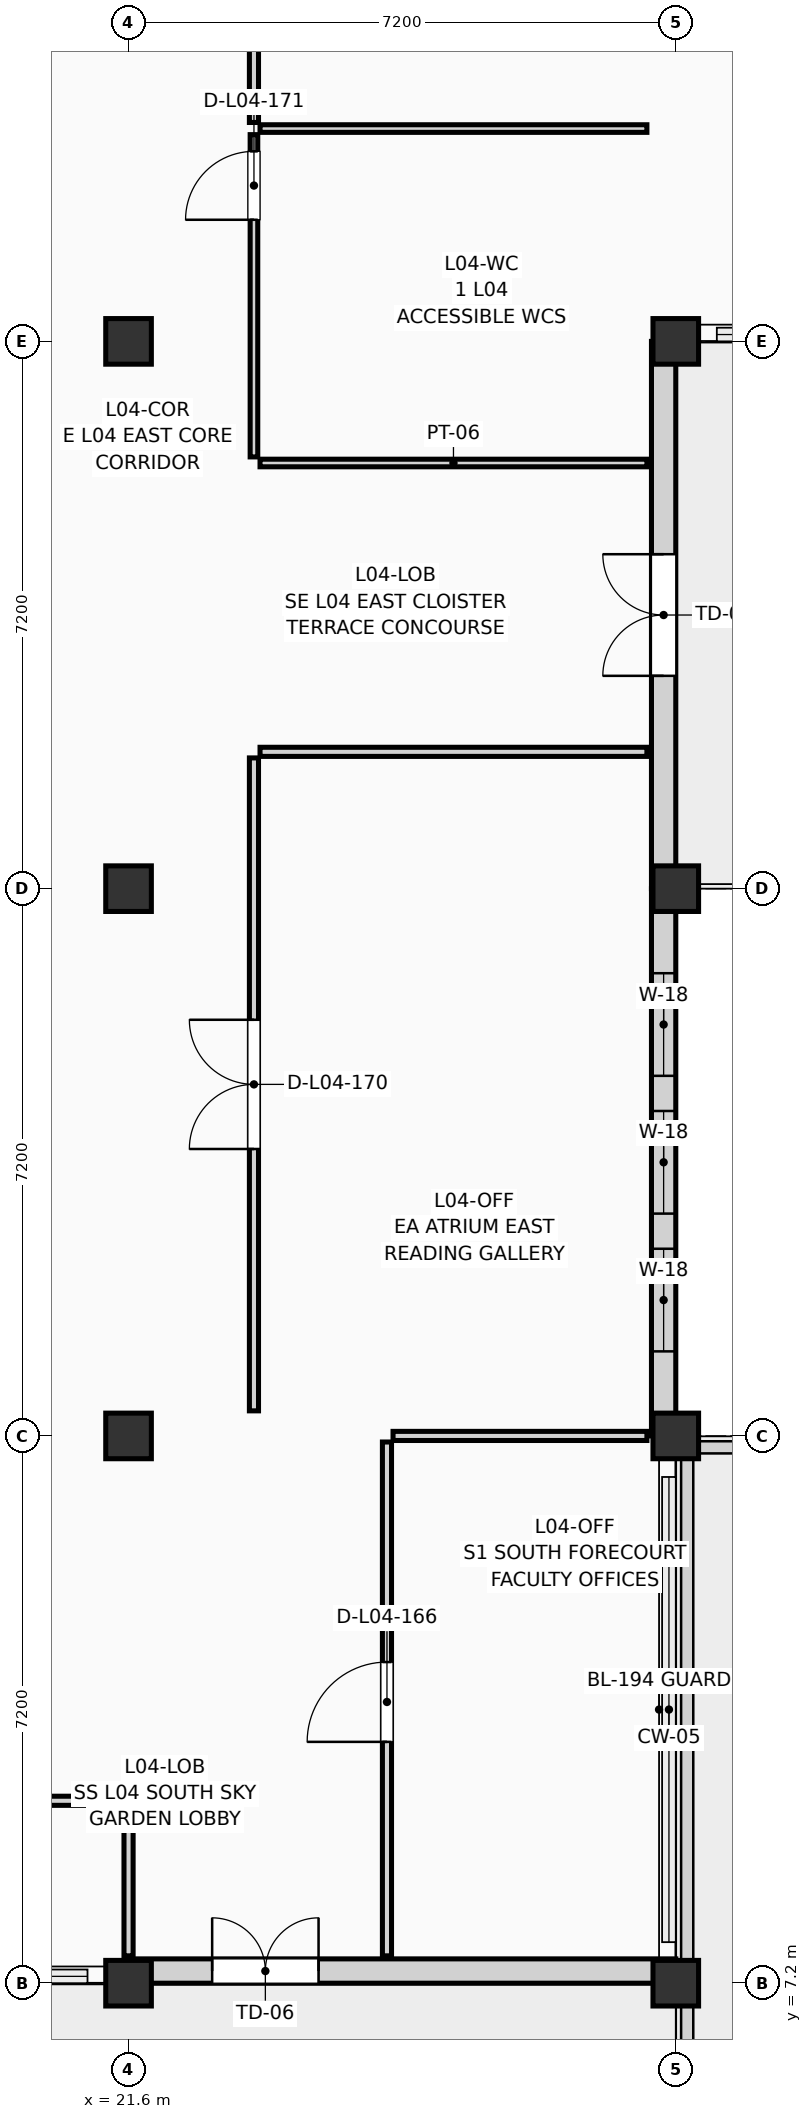
"""IFC4 building model, lengths in metres.
Left out: names, types, materials, properties, quantities, classifications, styles, units other than length and angle.
Written with IfcOpenShell. Run it as: python <this file> out.ifc"""

import sys

from ifc_helpers import new_model, si_unit, direction, frame, frame_2d, origin, origin_2d, place, context, subcontext, project, spatial, rectangle, extrude, element, fill, save


model = new_model("IFC4")
c1 = context("Model", 3, precision=1e-05, world=origin(), true_north=direction((0.0, 1.0)))
c2 = subcontext(c1, "Body", "Model", "MODEL_VIEW")
j1 = project(units=[si_unit("LENGTHUNIT", "METRE"), si_unit("PLANEANGLEUNIT", "RADIAN")], contexts=[c1])
p1 = place(None, origin())
s1 = spatial("IfcSite", under=j1, at=p1, CompositionType="ELEMENT")
p2 = place(p1, origin())
s2 = spatial("IfcBuilding", under=s1, at=p2, CompositionType="ELEMENT")
p3 = place(p2, frame((0.0, 0.0, 15.75)))
s3 = spatial("IfcBuildingStorey", under=s2, at=p3, CompositionType="ELEMENT", Elevation=15.75)
for number, where, z_axis, x_axis in (
    (1, (21.6, 7.2, 0.0), (0.0, 0.0, 1.0), (1.0, 0.0, 0.0)),
    (2, (21.6, 14.4, 0.0), (0.0, 0.0, 1.0), (1.0, 0.0, 0.0)),
    (3, (21.6, 21.6, 0.0), (0.0, 0.0, 1.0), (1.0, 0.0, 0.0)),
    (4, (21.6, 28.8, 0.0), (0.0, 0.0, 1.0), (1.0, 0.0, 0.0)),
    (5, (28.8, 7.2, 0.0), (0.0, 0.0, 1.0), (1.0, 0.0, 0.0)),
    (6, (28.8, 14.4, 0.0), (0.0, 0.0, 1.0), (1.0, 0.0, 0.0)),
    (7, (28.8, 21.6, 0.0), (0.0, 0.0, 1.0), (1.0, 0.0, 0.0)),
    (8, (28.8, 28.8, 0.0), (0.0, 0.0, 1.0), (1.0, 0.0, 0.0)),
):
    element("IfcColumn", number, at=place(p3, frame(where, z_axis=z_axis, x_axis=x_axis)), inside=s3, PredefinedType="COLUMN", context=c2, shape_type="SweptSolid", body=[
        extrude(rectangle(XDim=0.6, YDim=0.6, at=origin_2d()), origin(), (0.0, 0.0, 1.0), 3.6),
    ])
p4 = place(p3, frame((28.64, 21.6, 0.0), z_axis=(0.0, 0.0, 1.0), x_axis=(0.0, 1.0, 0.0)))
e9 = element("IfcWall", 9, at=p4, inside=s3, PredefinedType="SOLIDWALL", context=c2, shape_type="SweptSolid", body=[
    extrude(rectangle(XDim=7.2, YDim=0.32, at=frame_2d((3.6, 0.0))), origin(), (0.0, 0.0, 1.0), 2.84),
])
p5 = place(p4, frame((2.8, 0.0, 0.0)))
e10 = element("IfcOpeningElement", 10, at=p5, cuts=e9, PredefinedType="OPENING", context=c2, shape_type="SweptSolid", body=[
    extrude(rectangle(XDim=1.6, YDim=2.25, at=frame_2d((0.8, 1.125))), frame((0.0, 0.172, 0.0), z_axis=(0.0, -1.0, 0.0), x_axis=(1.0, 0.0, 0.0)), (0.0, 0.0, 1.0), 0.344),
])
p6 = place(p3, frame((28.64, 14.4, 0.0), z_axis=(0.0, 0.0, 1.0), x_axis=(0.0, 1.0, 0.0)))
e11 = element("IfcWall", 11, at=p6, inside=s3, PredefinedType="SOLIDWALL", context=c2, shape_type="SweptSolid", body=[
    extrude(rectangle(XDim=7.2, YDim=0.32, at=frame_2d((3.6, 0.0))), origin(), (0.0, 0.0, 1.0), 2.84),
])
p7 = place(p6, frame((1.113, 0.0, 0.18)))
e12 = element("IfcOpeningElement", 12, at=p7, cuts=e11, PredefinedType="OPENING", context=c2, shape_type="SweptSolid", body=[
    extrude(rectangle(XDim=1.35, YDim=2.45, at=frame_2d((0.675, 1.225))), frame((0.0, 0.172, 0.0), z_axis=(0.0, -1.0, 0.0), x_axis=(1.0, 0.0, 0.0)), (0.0, 0.0, 1.0), 0.344),
])
p8 = place(p6, frame((2.925, 0.0, 0.18)))
e13 = element("IfcOpeningElement", 13, at=p8, cuts=e11, PredefinedType="OPENING", context=c2, shape_type="SweptSolid", body=[
    extrude(rectangle(XDim=1.35, YDim=2.45, at=frame_2d((0.675, 1.225))), frame((0.0, 0.172, 0.0), z_axis=(0.0, -1.0, 0.0), x_axis=(1.0, 0.0, 0.0)), (0.0, 0.0, 1.0), 0.344),
])
p9 = place(p6, frame((4.738, 0.0, 0.18)))
e14 = element("IfcOpeningElement", 14, at=p9, cuts=e11, PredefinedType="OPENING", context=c2, shape_type="SweptSolid", body=[
    extrude(rectangle(XDim=1.35, YDim=2.45, at=frame_2d((0.675, 1.225))), frame((0.0, 0.172, 0.0), z_axis=(0.0, -1.0, 0.0), x_axis=(1.0, 0.0, 0.0)), (0.0, 0.0, 1.0), 0.344),
])
p10 = place(p3, frame((21.6, 7.36, 0.0), z_axis=(0.0, 0.0, 1.0), x_axis=(1.0, 0.0, 0.0)))
e15 = element("IfcWall", 15, at=p10, inside=s3, PredefinedType="SOLIDWALL", context=c2, shape_type="SweptSolid", body=[
    extrude(rectangle(XDim=7.2, YDim=0.32, at=frame_2d((3.6, 0.0))), origin(), (0.0, 0.0, 1.0), 2.84),
])
p11 = place(p10, frame((1.1, 0.0, 0.0)))
e16 = element("IfcOpeningElement", 16, at=p11, cuts=e15, PredefinedType="OPENING", context=c2, shape_type="SweptSolid", body=[
    extrude(rectangle(XDim=1.4, YDim=2.2, at=frame_2d((0.7, 1.1))), frame((0.0, 0.172, 0.0), z_axis=(0.0, -1.0, 0.0), x_axis=(1.0, 0.0, 0.0)), (0.0, 0.0, 1.0), 0.344),
])
for number, where, z_axis, x_axis in (
    (17, (43.05, 14.25, 0.1), (0.0, 0.0, 1.0), (-1.0, 0.0, 0.0)),
    (18, (28.95, 14.25, 0.1), (0.0, 0.0, 1.0), (0.0, -1.0, 0.0)),
):
    element("IfcWall", number, at=place(p3, frame(where, z_axis=z_axis, x_axis=x_axis)), inside=s3, PredefinedType="PARAPET", context=c2, shape_type="SweptSolid", body=[
        extrude(rectangle(XDim=14.1, YDim=0.16, at=frame_2d((7.05, 0.0))), origin(), (0.0, 0.0, 1.0), 1.0),
    ])
p12 = place(p3, frame((21.6, 7.56, 0.0), z_axis=(0.0, 0.0, 1.0), x_axis=(0.0, 1.0, 0.0)))
e19 = element("IfcWall", 19, at=p12, inside=s3, PredefinedType="PARTITIONING", context=c2, shape_type="SweptSolid", body=[
    extrude(rectangle(XDim=1.96, YDim=0.12, at=frame_2d((0.98, 0.0))), origin(), (0.0, 0.0, 1.0), 2.655),
])
p13 = place(p3, frame((7.58, 9.6, 0.0), z_axis=(0.0, 0.0, 1.0), x_axis=(1.0, 0.0, 0.0)))
e20 = element("IfcWall", 20, at=p13, inside=s3, PredefinedType="PARTITIONING", context=c2, shape_type="SweptSolid", body=[
    extrude(rectangle(XDim=13.94, YDim=0.12, at=frame_2d((6.97, 0.0))), origin(), (0.0, 0.0, 1.0), 3.375),
])
p14 = place(p13, frame((7.325, 0.0, 0.0)))
e21 = element("IfcOpeningElement", 21, at=p14, cuts=e20, PredefinedType="OPENING", context=c2, shape_type="SweptSolid", body=[
    extrude(rectangle(XDim=1.32, YDim=2.2, at=frame_2d((0.66, 1.1))), frame((0.0, 0.072, 0.0), z_axis=(0.0, -1.0, 0.0), x_axis=(1.0, 0.0, 0.0)), (0.0, 0.0, 1.0), 0.144),
])
p15 = place(p3, frame((25.0, 7.56, 0.0), z_axis=(0.0, 0.0, 1.0), x_axis=(0.0, 1.0, 0.0)))
e22 = element("IfcWall", 22, at=p15, inside=s3, PredefinedType="PARTITIONING", context=c2, shape_type="SweptSolid", body=[
    extrude(rectangle(XDim=6.76, YDim=0.12, at=frame_2d((3.38, 0.0))), origin(), (0.0, 0.0, 1.0), 3.375),
])
p16 = place(p15, frame((2.815, 0.0, 0.0)))
e23 = element("IfcOpeningElement", 23, at=p16, cuts=e22, PredefinedType="OPENING", context=c2, shape_type="SweptSolid", body=[
    extrude(rectangle(XDim=1.05, YDim=2.18, at=frame_2d((0.525, 1.09))), frame((0.0, 0.072, 0.0), z_axis=(0.0, -1.0, 0.0), x_axis=(1.0, 0.0, 0.0)), (0.0, 0.0, 1.0), 0.144),
])
p17 = place(p3, frame((25.08, 14.4, 0.0), z_axis=(0.0, 0.0, 1.0), x_axis=(1.0, 0.0, 0.0)))
e24 = element("IfcWall", 24, at=p17, inside=s3, PredefinedType="PARTITIONING", context=c2, shape_type="SweptSolid", body=[
    extrude(rectangle(XDim=3.34, YDim=0.12, at=frame_2d((1.67, 0.0))), origin(), (0.0, 0.0, 1.0), 2.655),
])
p18 = place(p3, frame((23.25, 14.73, 0.0), z_axis=(0.0, 0.0, 1.0), x_axis=(0.0, 1.0, 0.0)))
e25 = element("IfcWall", 25, at=p18, inside=s3, PredefinedType="PARTITIONING", context=c2, shape_type="SweptSolid", body=[
    extrude(rectangle(XDim=8.59, YDim=0.12, at=frame_2d((4.295, 0.0))), origin(), (0.0, 0.0, 1.0), 3.375),
])
p19 = place(p18, frame((3.445, 0.0, 0.0)))
e26 = element("IfcOpeningElement", 26, at=p19, cuts=e25, PredefinedType="OPENING", context=c2, shape_type="SweptSolid", body=[
    extrude(rectangle(XDim=1.7, YDim=2.28, at=frame_2d((0.85, 1.14))), frame((0.0, 0.072, 0.0), z_axis=(0.0, -1.0, 0.0), x_axis=(1.0, 0.0, 0.0)), (0.0, 0.0, 1.0), 0.144),
])
p20 = place(p3, frame((23.33, 23.4, 0.0), z_axis=(0.0, 0.0, 1.0), x_axis=(1.0, 0.0, 0.0)))
e27 = element("IfcWall", 27, at=p20, inside=s3, PredefinedType="PARTITIONING", context=c2, shape_type="SweptSolid", body=[
    extrude(rectangle(XDim=5.09, YDim=0.12, at=frame_2d((2.545, 0.0))), origin(), (0.0, 0.0, 1.0), 3.375),
])
p21 = place(p3, frame((23.25, 27.28, 0.0), z_axis=(0.0, 0.0, 1.0), x_axis=(0.0, 1.0, 0.0)))
e28 = element("IfcWall", 28, at=p21, inside=s3, PredefinedType="PARTITIONING", context=c2, shape_type="SweptSolid", body=[
    extrude(rectangle(XDim=4.24, YDim=0.1, at=frame_2d((2.12, 0.0))), origin(), (0.0, 0.0, 1.0), 3.375),
])
p22 = place(p21, frame((3.12, 0.0, 0.0)))
e29 = element("IfcOpeningElement", 29, at=p22, cuts=e28, PredefinedType="OPENING", context=c2, shape_type="SweptSolid", body=[
    extrude(rectangle(XDim=0.9, YDim=2.1, at=frame_2d((0.45, 1.05))), frame((0.0, 0.062, 0.0), z_axis=(0.0, -1.0, 0.0), x_axis=(1.0, 0.0, 0.0)), (0.0, 0.0, 1.0), 0.124),
])
for number, where, z_axis, x_axis in (
    (30, (23.33, 27.2, 0.0), (0.0, 0.0, 1.0), (1.0, 0.0, 0.0)),
    (31, (23.33, 31.6, 0.0), (0.0, 0.0, 1.0), (1.0, 0.0, 0.0)),
):
    element("IfcWall", number, at=place(p3, frame(where, z_axis=z_axis, x_axis=x_axis)), inside=s3, PredefinedType="PARTITIONING", context=c2, shape_type="SweptSolid", body=[
        extrude(rectangle(XDim=5.09, YDim=0.1, at=frame_2d((2.545, 0.0))), origin(), (0.0, 0.0, 1.0), 3.375),
    ])
p23 = place(p3, frame((23.25, 31.68, 0.0), z_axis=(0.0, 0.0, 1.0), x_axis=(0.0, 1.0, 0.0)))
e32 = element("IfcWall", 32, at=p23, inside=s3, PredefinedType="PARTITIONING", context=c2, shape_type="SweptSolid", body=[
    extrude(rectangle(XDim=10.64, YDim=0.12, at=frame_2d((5.32, 0.0))), origin(), (0.0, 0.0, 1.0), 3.375),
])
p24 = place(p23, frame((5.77, 0.0, 0.0)))
e33 = element("IfcOpeningElement", 33, at=p24, cuts=e32, PredefinedType="OPENING", context=c2, shape_type="SweptSolid", body=[
    extrude(rectangle(XDim=1.32, YDim=2.2, at=frame_2d((0.66, 1.1))), frame((0.0, 0.072, 0.0), z_axis=(0.0, -1.0, 0.0), x_axis=(1.0, 0.0, 0.0)), (0.0, 0.0, 1.0), 0.144),
])
p25 = place(p5, origin())
e34 = element("IfcDoor", 34, at=p25, inside=s3, OperationType="DOUBLE_DOOR_SINGLE_SWING", PredefinedType="DOOR", context=c2, shape_type="SweptSolid", body=[
    extrude(rectangle(XDim=1.6, YDim=2.25, at=frame_2d((0.8, 1.125))), frame((0.0, 0.025, 0.0), z_axis=(0.0, -1.0, 0.0), x_axis=(1.0, 0.0, 0.0)), (0.0, 0.0, 1.0), 0.05),
])
fill(e10, e34)
p26 = place(p7, origin())
e35 = element("IfcWindow", 35, at=p26, inside=s3, PartitioningType="SINGLE_PANEL", PredefinedType="WINDOW", context=c2, shape_type="SweptSolid", body=[
    extrude(rectangle(XDim=1.35, YDim=2.45, at=frame_2d((0.675, 1.225))), frame((0.0, 0.03, 0.0), z_axis=(0.0, -1.0, 0.0), x_axis=(1.0, 0.0, 0.0)), (0.0, 0.0, 1.0), 0.06),
])
fill(e12, e35)
p27 = place(p8, origin())
e36 = element("IfcWindow", 36, at=p27, inside=s3, PartitioningType="SINGLE_PANEL", PredefinedType="WINDOW", context=c2, shape_type="SweptSolid", body=[
    extrude(rectangle(XDim=1.35, YDim=2.45, at=frame_2d((0.675, 1.225))), frame((0.0, 0.03, 0.0), z_axis=(0.0, -1.0, 0.0), x_axis=(1.0, 0.0, 0.0)), (0.0, 0.0, 1.0), 0.06),
])
fill(e13, e36)
p28 = place(p9, origin())
e37 = element("IfcWindow", 37, at=p28, inside=s3, PartitioningType="SINGLE_PANEL", PredefinedType="WINDOW", context=c2, shape_type="SweptSolid", body=[
    extrude(rectangle(XDim=1.35, YDim=2.45, at=frame_2d((0.675, 1.225))), frame((0.0, 0.03, 0.0), z_axis=(0.0, -1.0, 0.0), x_axis=(1.0, 0.0, 0.0)), (0.0, 0.0, 1.0), 0.06),
])
fill(e14, e37)
p29 = place(p11, origin())
e38 = element("IfcDoor", 38, at=p29, inside=s3, OperationType="DOUBLE_DOOR_SINGLE_SWING", PredefinedType="DOOR", context=c2, shape_type="SweptSolid", body=[
    extrude(rectangle(XDim=1.4, YDim=2.2, at=frame_2d((0.7, 1.1))), frame((0.0, 0.025, 0.0), z_axis=(0.0, -1.0, 0.0), x_axis=(1.0, 0.0, 0.0)), (0.0, 0.0, 1.0), 0.05),
])
fill(e16, e38)
p30 = place(p16, origin())
e39 = element("IfcDoor", 39, at=p30, inside=s3, OperationType="SINGLE_SWING_LEFT", PredefinedType="DOOR", context=c2, shape_type="SweptSolid", body=[
    extrude(rectangle(XDim=1.05, YDim=2.18, at=frame_2d((0.525, 1.09))), frame((0.0, 0.025, 0.0), z_axis=(0.0, -1.0, 0.0), x_axis=(1.0, 0.0, 0.0)), (0.0, 0.0, 1.0), 0.05),
])
fill(e23, e39)
p31 = place(p19, origin())
e40 = element("IfcDoor", 40, at=p31, inside=s3, OperationType="DOUBLE_DOOR_SINGLE_SWING", PredefinedType="DOOR", context=c2, shape_type="SweptSolid", body=[
    extrude(rectangle(XDim=1.7, YDim=2.28, at=frame_2d((0.85, 1.14))), frame((0.0, 0.025, 0.0), z_axis=(0.0, -1.0, 0.0), x_axis=(1.0, 0.0, 0.0)), (0.0, 0.0, 1.0), 0.05),
])
fill(e26, e40)
p32 = place(p22, origin())
e41 = element("IfcDoor", 41, at=p32, inside=s3, OperationType="SINGLE_SWING_LEFT", PredefinedType="DOOR", context=c2, shape_type="SweptSolid", body=[
    extrude(rectangle(XDim=0.9, YDim=2.1, at=frame_2d((0.45, 1.05))), frame((0.0, 0.025, 0.0), z_axis=(0.0, -1.0, 0.0), x_axis=(1.0, 0.0, 0.0)), (0.0, 0.0, 1.0), 0.05),
])
fill(e29, e41)
save(model, sys.argv[1])
